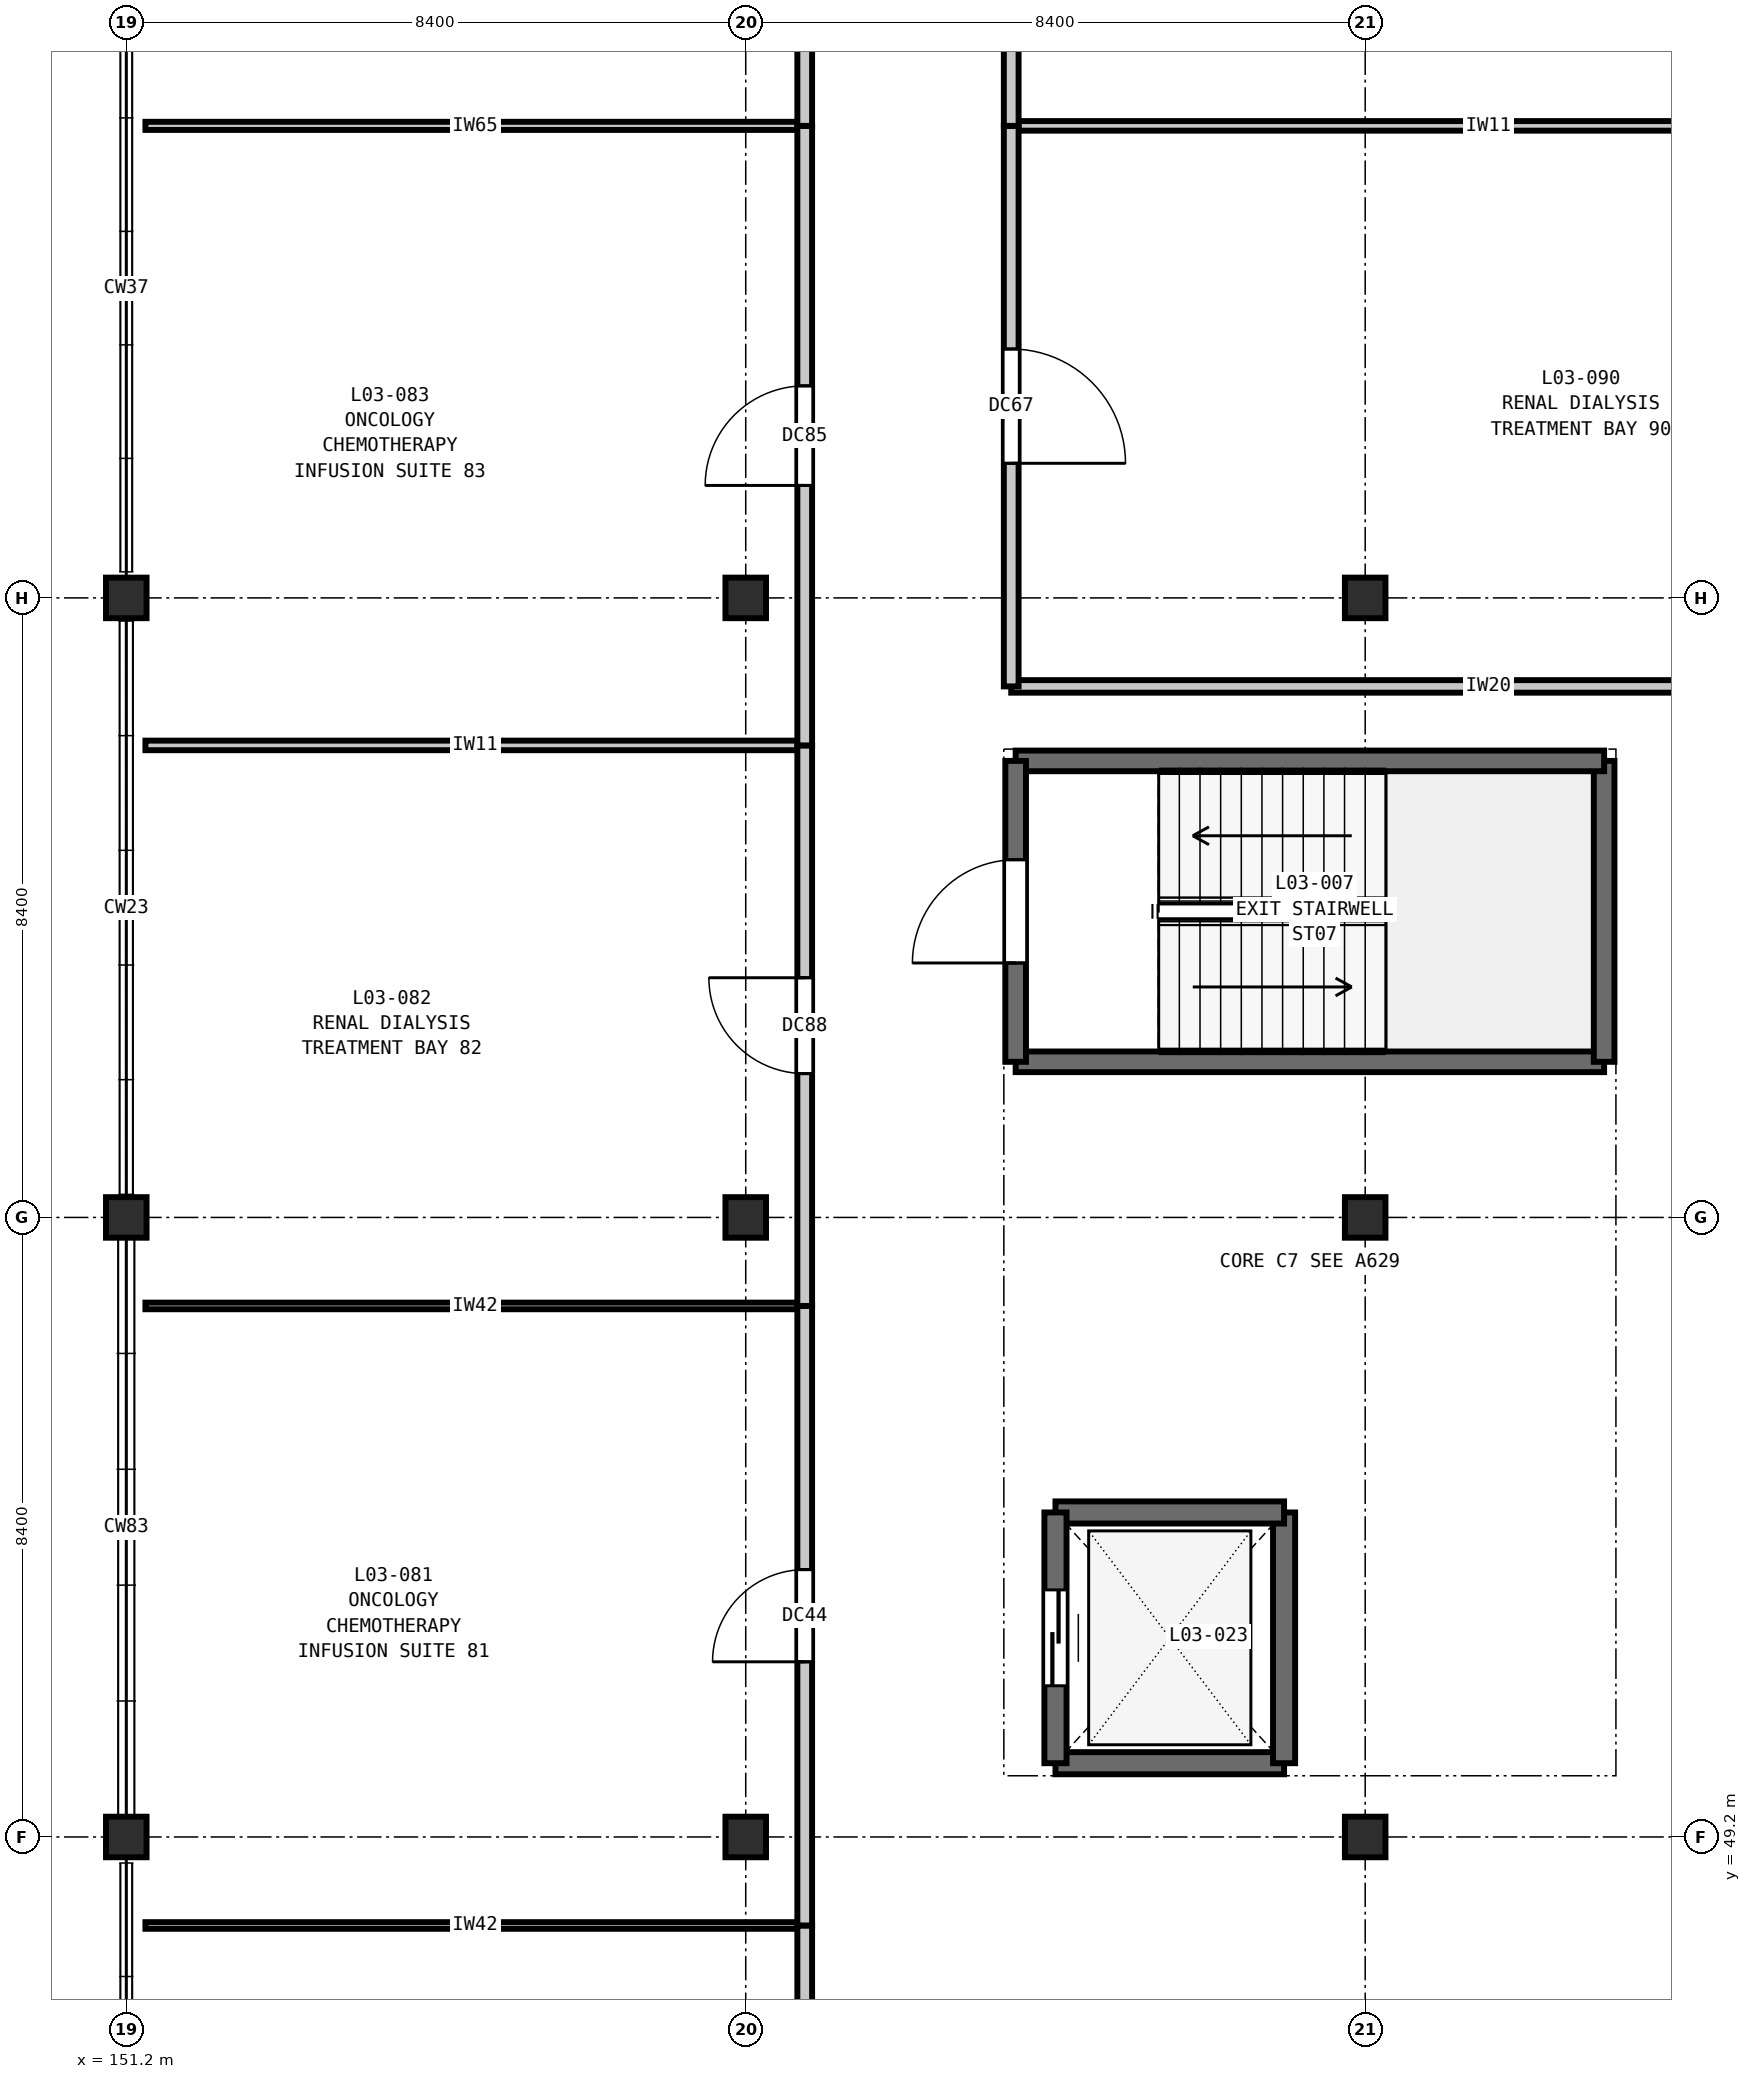
"""IFC4 building model, lengths in metres.
Left out: names, types, materials, properties, quantities, classifications, styles, units other than length and angle.
Written with IfcOpenShell. Run it as: python <this file> out.ifc"""

import sys

from ifc_helpers import new_model, si_unit, direction, frame, frame_2d, origin, origin_2d, place, context, subcontext, project, spatial, rectangle, extrude, element, fill, save


model = new_model("IFC4")
c1 = context("Model", 3, precision=1e-05, world=origin(), true_north=direction((0.0, 1.0)))
c2 = subcontext(c1, "Body", "Model", "MODEL_VIEW")
j1 = project(units=[si_unit("LENGTHUNIT", "METRE"), si_unit("PLANEANGLEUNIT", "RADIAN")], contexts=[c1])
p1 = place(None, origin())
s1 = spatial("IfcSite", under=j1, at=p1, CompositionType="ELEMENT")
p2 = place(p1, origin())
s2 = spatial("IfcBuilding", under=s1, at=p2, CompositionType="ELEMENT")
p3 = place(p2, frame((0.0, 0.0, 16.2)))
s3 = spatial("IfcBuildingStorey", under=s2, at=p3, CompositionType="ELEMENT", Elevation=16.2)
for number, where, z_axis, x_axis in (
    (1, (151.2, 49.2, 0.0), (0.0, 0.0, 1.0), (1.0, 0.0, 0.0)),
    (2, (151.2, 57.6, 0.0), (0.0, 0.0, 1.0), (1.0, 0.0, 0.0)),
    (3, (151.2, 66.0, 0.0), (0.0, 0.0, 1.0), (1.0, 0.0, 0.0)),
    (4, (159.6, 49.2, 0.0), (0.0, 0.0, 1.0), (1.0, 0.0, 0.0)),
    (5, (159.6, 57.6, 0.0), (0.0, 0.0, 1.0), (1.0, 0.0, 0.0)),
    (6, (159.6, 66.0, 0.0), (0.0, 0.0, 1.0), (1.0, 0.0, 0.0)),
    (7, (168.0, 49.2, 0.0), (0.0, 0.0, 1.0), (1.0, 0.0, 0.0)),
    (8, (168.0, 57.6, 0.0), (0.0, 0.0, 1.0), (1.0, 0.0, 0.0)),
    (9, (168.0, 66.0, 0.0), (0.0, 0.0, 1.0), (1.0, 0.0, 0.0)),
):
    element("IfcColumn", number, at=place(p3, frame(where, z_axis=z_axis, x_axis=x_axis)), inside=s3, PredefinedType="COLUMN", context=c2, shape_type="SweptSolid", body=[
        extrude(rectangle(XDim=0.55, YDim=0.55, at=origin_2d()), origin(), (0.0, 0.0, 1.0), 4.2),
    ])
p4 = place(p3, frame((163.26, 59.71, 0.0), z_axis=(0.0, 0.0, 1.0), x_axis=(1.0, 0.0, 0.0)))
e10 = element("IfcWall", 10, at=p4, inside=s3, PredefinedType="SHEAR", context=c2, shape_type="SweptSolid", body=[
    extrude(rectangle(XDim=7.98, YDim=0.28, at=frame_2d((3.99, 0.0))), origin(), (0.0, 0.0, 1.0), 4.2),
])
p5 = place(p3, frame((171.24, 59.71, 0.0), z_axis=(0.0, 0.0, 1.0), x_axis=(0.0, 1.0, 0.0)))
e11 = element("IfcWall", 11, at=p5, inside=s3, PredefinedType="SHEAR", context=c2, shape_type="SweptSolid", body=[
    extrude(rectangle(XDim=4.08, YDim=0.28, at=frame_2d((2.04, 0.0))), origin(), (0.0, 0.0, 1.0), 4.2),
])
p6 = place(p3, frame((171.24, 63.79, 0.0), z_axis=(0.0, 0.0, 1.0), x_axis=(-1.0, 0.0, 0.0)))
e12 = element("IfcWall", 12, at=p6, inside=s3, PredefinedType="SHEAR", context=c2, shape_type="SweptSolid", body=[
    extrude(rectangle(XDim=7.98, YDim=0.28, at=frame_2d((3.99, 0.0))), origin(), (0.0, 0.0, 1.0), 4.2),
])
p7 = place(p3, frame((163.26, 63.79, 0.0), z_axis=(0.0, 0.0, 1.0), x_axis=(0.0, -1.0, 0.0)))
e13 = element("IfcWall", 13, at=p7, inside=s3, PredefinedType="SHEAR", context=c2, shape_type="SweptSolid", body=[
    extrude(rectangle(XDim=4.08, YDim=0.28, at=frame_2d((2.04, 0.0))), origin(), (0.0, 0.0, 1.0), 4.2),
])
p8 = place(p7, frame((1.34, 0.0, 0.0)))
e14 = element("IfcOpeningElement", 14, at=p8, cuts=e13, PredefinedType="OPENING", context=c2, shape_type="SweptSolid", body=[
    extrude(rectangle(XDim=1.4, YDim=2.2, at=frame_2d((0.7, 1.1))), frame((0.0, 0.15, 0.0), z_axis=(0.0, -1.0, 0.0), x_axis=(1.0, 0.0, 0.0)), (0.0, 0.0, 1.0), 0.3),
])
p9 = place(p3, frame((163.8, 50.2, 0.0), z_axis=(0.0, 0.0, 1.0), x_axis=(1.0, 0.0, 0.0)))
e15 = element("IfcWall", 15, at=p9, inside=s3, PredefinedType="SHEAR", context=c2, shape_type="SweptSolid", body=[
    extrude(rectangle(XDim=3.1, YDim=0.3, at=frame_2d((1.55, 0.0))), origin(), (0.0, 0.0, 1.0), 4.2),
])
p10 = place(p3, frame((166.9, 50.2, 0.0), z_axis=(0.0, 0.0, 1.0), x_axis=(0.0, 1.0, 0.0)))
e16 = element("IfcWall", 16, at=p10, inside=s3, PredefinedType="SHEAR", context=c2, shape_type="SweptSolid", body=[
    extrude(rectangle(XDim=3.4, YDim=0.3, at=frame_2d((1.7, 0.0))), origin(), (0.0, 0.0, 1.0), 4.2),
])
p11 = place(p3, frame((166.9, 53.6, 0.0), z_axis=(0.0, 0.0, 1.0), x_axis=(-1.0, 0.0, 0.0)))
e17 = element("IfcWall", 17, at=p11, inside=s3, PredefinedType="SHEAR", context=c2, shape_type="SweptSolid", body=[
    extrude(rectangle(XDim=3.1, YDim=0.3, at=frame_2d((1.55, 0.0))), origin(), (0.0, 0.0, 1.0), 4.2),
])
p12 = place(p3, frame((163.8, 53.6, 0.0), z_axis=(0.0, 0.0, 1.0), x_axis=(0.0, -1.0, 0.0)))
e18 = element("IfcWall", 18, at=p12, inside=s3, PredefinedType="SHEAR", context=c2, shape_type="SweptSolid", body=[
    extrude(rectangle(XDim=3.4, YDim=0.3, at=frame_2d((1.7, 0.0))), origin(), (0.0, 0.0, 1.0), 4.2),
])
p13 = place(p12, frame((1.05, 0.0, 0.0)))
e19 = element("IfcOpeningElement", 19, at=p13, cuts=e18, PredefinedType="OPENING", context=c2, shape_type="SweptSolid", body=[
    extrude(rectangle(XDim=1.3, YDim=2.2, at=frame_2d((0.65, 1.1))), frame((0.0, 0.16, 0.0), z_axis=(0.0, -1.0, 0.0), x_axis=(1.0, 0.0, 0.0)), (0.0, 0.0, 1.0), 0.32),
])
for number, where, z_axis, x_axis in (
    (20, (151.46, 48.0, 0.0), (0.0, 0.0, 1.0), (1.0, 0.0, 0.0)),
    (21, (151.46, 56.4, 0.0), (0.0, 0.0, 1.0), (1.0, 0.0, 0.0)),
):
    element("IfcWall", number, at=place(p3, frame(where, z_axis=z_axis, x_axis=x_axis)), inside=s3, PredefinedType="PARTITIONING", context=c2, shape_type="SweptSolid", body=[
        extrude(rectangle(XDim=8.94, YDim=0.09, at=frame_2d((4.47, 0.0))), origin(), (0.0, 0.0, 1.0), 3.89),
    ])
p14 = place(p3, frame((151.46, 64.0, 0.0), z_axis=(0.0, 0.0, 1.0), x_axis=(1.0, 0.0, 0.0)))
e22 = element("IfcWall", 22, at=p14, inside=s3, PredefinedType="PARTITIONING", context=c2, shape_type="SweptSolid", body=[
    extrude(rectangle(XDim=8.94, YDim=0.13, at=frame_2d((4.47, 0.0))), origin(), (0.0, 0.0, 1.0), 3.89),
])
p15 = place(p3, frame((163.2, 64.8, 0.0), z_axis=(0.0, 0.0, 1.0), x_axis=(1.0, 0.0, 0.0)))
e23 = element("IfcWall", 23, at=p15, inside=s3, PredefinedType="PARTITIONING", context=c2, shape_type="SweptSolid", body=[
    extrude(rectangle(XDim=12.94, YDim=0.17, at=frame_2d((6.47, 0.0))), origin(), (0.0, 0.0, 1.0), 3.89),
])
p16 = place(p3, frame((151.46, 72.4, 0.0), z_axis=(0.0, 0.0, 1.0), x_axis=(1.0, 0.0, 0.0)))
e24 = element("IfcWall", 24, at=p16, inside=s3, PredefinedType="PARTITIONING", context=c2, shape_type="SweptSolid", body=[
    extrude(rectangle(XDim=8.94, YDim=0.11, at=frame_2d((4.47, 0.0))), origin(), (0.0, 0.0, 1.0), 3.89),
])
p17 = place(p3, frame((163.2, 72.4, 0.0), z_axis=(0.0, 0.0, 1.0), x_axis=(1.0, 0.0, 0.0)))
e25 = element("IfcWall", 25, at=p17, inside=s3, PredefinedType="PARTITIONING", context=c2, shape_type="SweptSolid", body=[
    extrude(rectangle(XDim=12.94, YDim=0.13, at=frame_2d((6.47, 0.0))), origin(), (0.0, 0.0, 1.0), 3.89),
])
p18 = place(p3, frame((160.4, 40.4, 0.0), z_axis=(0.0, 0.0, 1.0), x_axis=(0.0, 1.0, 0.0)))
e26 = element("IfcWall", 26, at=p18, inside=s3, PredefinedType="PARTITIONING", context=c2, shape_type="SweptSolid", body=[
    extrude(rectangle(XDim=7.6, YDim=0.2, at=frame_2d((3.8, 0.0))), origin(), (0.0, 0.0, 1.0), 3.89),
])
p19 = place(p18, frame((2.875, 0.0, 0.0)))
e27 = element("IfcOpeningElement", 27, at=p19, cuts=e26, PredefinedType="OPENING", context=c2, shape_type="SweptSolid", body=[
    extrude(rectangle(XDim=1.85, YDim=2.3, at=frame_2d((0.925, 1.15))), frame((0.0, 0.11, 0.0), z_axis=(0.0, -1.0, 0.0), x_axis=(1.0, 0.0, 0.0)), (0.0, 0.0, 1.0), 0.22),
])
p20 = place(p3, frame((160.4, 48.0, 0.0), z_axis=(0.0, 0.0, 1.0), x_axis=(0.0, 1.0, 0.0)))
e28 = element("IfcWall", 28, at=p20, inside=s3, PredefinedType="PARTITIONING", context=c2, shape_type="SweptSolid", body=[
    extrude(rectangle(XDim=8.4, YDim=0.2, at=frame_2d((4.2, 0.0))), origin(), (0.0, 0.0, 1.0), 3.89),
])
p21 = place(p20, frame((3.575, 0.0, 0.0)))
e29 = element("IfcOpeningElement", 29, at=p21, cuts=e28, PredefinedType="OPENING", context=c2, shape_type="SweptSolid", body=[
    extrude(rectangle(XDim=1.25, YDim=2.15, at=frame_2d((0.625, 1.075))), frame((0.0, 0.11, 0.0), z_axis=(0.0, -1.0, 0.0), x_axis=(1.0, 0.0, 0.0)), (0.0, 0.0, 1.0), 0.22),
])
p22 = place(p3, frame((160.4, 56.4, 0.0), z_axis=(0.0, 0.0, 1.0), x_axis=(0.0, 1.0, 0.0)))
e30 = element("IfcWall", 30, at=p22, inside=s3, PredefinedType="PARTITIONING", context=c2, shape_type="SweptSolid", body=[
    extrude(rectangle(XDim=7.6, YDim=0.2, at=frame_2d((3.8, 0.0))), origin(), (0.0, 0.0, 1.0), 3.89),
])
p23 = place(p22, frame((3.15, 0.0, 0.0)))
e31 = element("IfcOpeningElement", 31, at=p23, cuts=e30, PredefinedType="OPENING", context=c2, shape_type="SweptSolid", body=[
    extrude(rectangle(XDim=1.3, YDim=2.2, at=frame_2d((0.65, 1.1))), frame((0.0, 0.11, 0.0), z_axis=(0.0, -1.0, 0.0), x_axis=(1.0, 0.0, 0.0)), (0.0, 0.0, 1.0), 0.22),
])
p24 = place(p3, frame((160.4, 64.0, 0.0), z_axis=(0.0, 0.0, 1.0), x_axis=(0.0, 1.0, 0.0)))
e32 = element("IfcWall", 32, at=p24, inside=s3, PredefinedType="PARTITIONING", context=c2, shape_type="SweptSolid", body=[
    extrude(rectangle(XDim=8.4, YDim=0.2, at=frame_2d((4.2, 0.0))), origin(), (0.0, 0.0, 1.0), 3.89),
])
p25 = place(p24, frame((3.525, 0.0, 0.0)))
e33 = element("IfcOpeningElement", 33, at=p25, cuts=e32, PredefinedType="OPENING", context=c2, shape_type="SweptSolid", body=[
    extrude(rectangle(XDim=1.35, YDim=2.2, at=frame_2d((0.675, 1.1))), frame((0.0, 0.11, 0.0), z_axis=(0.0, -1.0, 0.0), x_axis=(1.0, 0.0, 0.0)), (0.0, 0.0, 1.0), 0.22),
])
p26 = place(p3, frame((160.4, 72.4, 0.0), z_axis=(0.0, 0.0, 1.0), x_axis=(0.0, 1.0, 0.0)))
e34 = element("IfcWall", 34, at=p26, inside=s3, PredefinedType="PARTITIONING", context=c2, shape_type="SweptSolid", body=[
    extrude(rectangle(XDim=10.4, YDim=0.2, at=frame_2d((5.2, 0.0))), origin(), (0.0, 0.0, 1.0), 3.89),
])
p27 = place(p26, frame((4.475, 0.0, 0.0)))
e35 = element("IfcOpeningElement", 35, at=p27, cuts=e34, PredefinedType="OPENING", context=c2, shape_type="SweptSolid", body=[
    extrude(rectangle(XDim=1.45, YDim=2.25, at=frame_2d((0.725, 1.125))), frame((0.0, 0.11, 0.0), z_axis=(0.0, -1.0, 0.0), x_axis=(1.0, 0.0, 0.0)), (0.0, 0.0, 1.0), 0.22),
])
p28 = place(p3, frame((163.2, 64.8, 0.0), z_axis=(0.0, 0.0, 1.0), x_axis=(0.0, 1.0, 0.0)))
e36 = element("IfcWall", 36, at=p28, inside=s3, PredefinedType="PARTITIONING", context=c2, shape_type="SweptSolid", body=[
    extrude(rectangle(XDim=7.6, YDim=0.2, at=frame_2d((3.8, 0.0))), origin(), (0.0, 0.0, 1.0), 3.89),
])
p29 = place(p28, frame((3.025, 0.0, 0.0)))
e37 = element("IfcOpeningElement", 37, at=p29, cuts=e36, PredefinedType="OPENING", context=c2, shape_type="SweptSolid", body=[
    extrude(rectangle(XDim=1.55, YDim=2.25, at=frame_2d((0.775, 1.125))), frame((0.0, 0.11, 0.0), z_axis=(0.0, -1.0, 0.0), x_axis=(1.0, 0.0, 0.0)), (0.0, 0.0, 1.0), 0.22),
])
p30 = place(p3, frame((163.2, 72.4, 0.0), z_axis=(0.0, 0.0, 1.0), x_axis=(0.0, 1.0, 0.0)))
e38 = element("IfcWall", 38, at=p30, inside=s3, PredefinedType="PARTITIONING", context=c2, shape_type="SweptSolid", body=[
    extrude(rectangle(XDim=10.4, YDim=0.2, at=frame_2d((5.2, 0.0))), origin(), (0.0, 0.0, 1.0), 3.89),
])
p31 = place(p30, frame((4.35, 0.0, 0.0)))
e39 = element("IfcOpeningElement", 39, at=p31, cuts=e38, PredefinedType="OPENING", context=c2, shape_type="SweptSolid", body=[
    extrude(rectangle(XDim=1.7, YDim=2.3, at=frame_2d((0.85, 1.15))), frame((0.0, 0.11, 0.0), z_axis=(0.0, -1.0, 0.0), x_axis=(1.0, 0.0, 0.0)), (0.0, 0.0, 1.0), 0.22),
])
p32 = place(p8, frame((1.4, 0.0, 0.0), z_axis=(0.0, 0.0, 1.0), x_axis=(-1.0, 0.0, 0.0)))
e40 = element("IfcDoor", 40, at=p32, inside=s3, OperationType="SINGLE_SWING_LEFT", PredefinedType="DOOR", context=c2, shape_type="SweptSolid", body=[
    extrude(rectangle(XDim=1.4, YDim=2.2, at=frame_2d((0.7, 1.1))), frame((0.0, 0.025, 0.0), z_axis=(0.0, -1.0, 0.0), x_axis=(1.0, 0.0, 0.0)), (0.0, 0.0, 1.0), 0.05),
])
fill(e14, e40)
p33 = place(p13, origin())
e41 = element("IfcDoor", 41, at=p33, inside=s3, OperationType="DOUBLE_DOOR_SLIDING", PredefinedType="DOOR", context=c2, shape_type="SweptSolid", body=[
    extrude(rectangle(XDim=1.3, YDim=2.2, at=frame_2d((0.65, 1.1))), frame((0.0, 0.025, 0.0), z_axis=(0.0, -1.0, 0.0), x_axis=(1.0, 0.0, 0.0)), (0.0, 0.0, 1.0), 0.05),
])
fill(e19, e41)
p34 = place(p21, origin())
e42 = element("IfcDoor", 42, at=p34, inside=s3, OperationType="SINGLE_SWING_LEFT", PredefinedType="DOOR", context=c2, shape_type="SweptSolid", body=[
    extrude(rectangle(XDim=1.25, YDim=2.15, at=frame_2d((0.625, 1.075))), frame((0.0, 0.025, 0.0), z_axis=(0.0, -1.0, 0.0), x_axis=(1.0, 0.0, 0.0)), (0.0, 0.0, 1.0), 0.05),
])
fill(e29, e42)
p35 = place(p23, origin())
e43 = element("IfcDoor", 43, at=p35, inside=s3, OperationType="SINGLE_SWING_RIGHT", PredefinedType="DOOR", context=c2, shape_type="SweptSolid", body=[
    extrude(rectangle(XDim=1.3, YDim=2.2, at=frame_2d((0.65, 1.1))), frame((0.0, 0.025, 0.0), z_axis=(0.0, -1.0, 0.0), x_axis=(1.0, 0.0, 0.0)), (0.0, 0.0, 1.0), 0.05),
])
fill(e31, e43)
p36 = place(p25, origin())
e44 = element("IfcDoor", 44, at=p36, inside=s3, OperationType="SINGLE_SWING_LEFT", PredefinedType="DOOR", context=c2, shape_type="SweptSolid", body=[
    extrude(rectangle(XDim=1.35, YDim=2.2, at=frame_2d((0.675, 1.1))), frame((0.0, 0.025, 0.0), z_axis=(0.0, -1.0, 0.0), x_axis=(1.0, 0.0, 0.0)), (0.0, 0.0, 1.0), 0.05),
])
fill(e33, e44)
p37 = place(p29, frame((1.55, 0.0, 0.0), z_axis=(0.0, 0.0, 1.0), x_axis=(-1.0, 0.0, 0.0)))
e45 = element("IfcDoor", 45, at=p37, inside=s3, OperationType="SINGLE_SWING_RIGHT", PredefinedType="DOOR", context=c2, shape_type="SweptSolid", body=[
    extrude(rectangle(XDim=1.55, YDim=2.25, at=frame_2d((0.775, 1.125))), frame((0.0, 0.025, 0.0), z_axis=(0.0, -1.0, 0.0), x_axis=(1.0, 0.0, 0.0)), (0.0, 0.0, 1.0), 0.05),
])
fill(e37, e45)
save(model, sys.argv[1])
